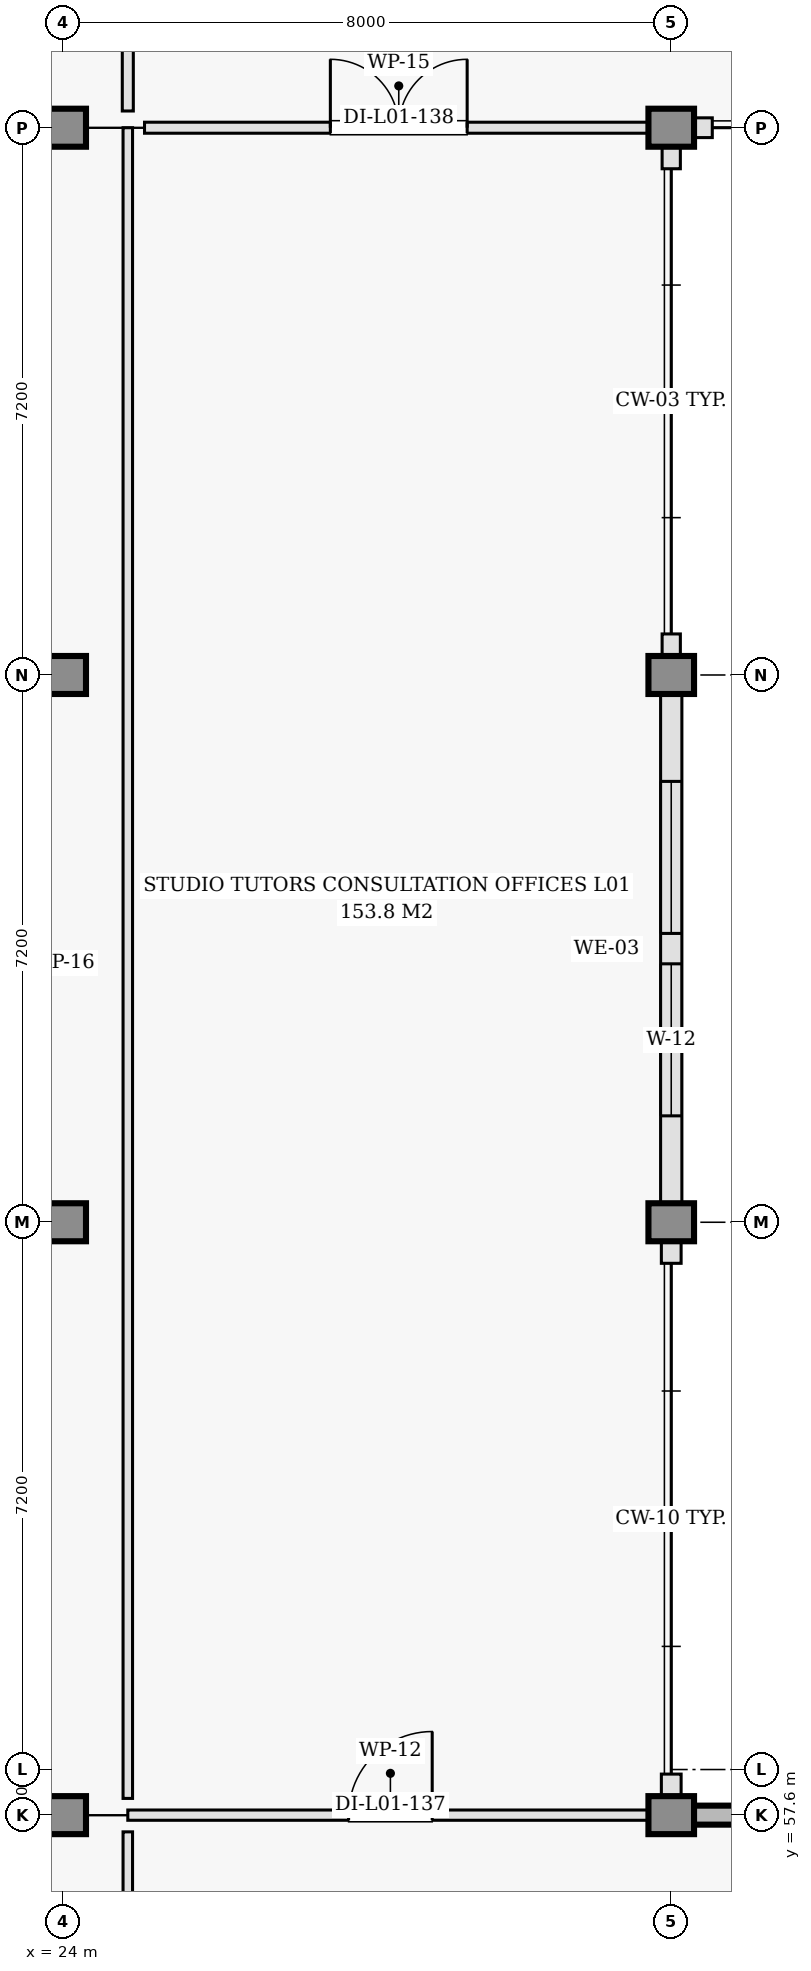
"""IFC4 building model, lengths in metres.
Left out: names, types, materials, properties, quantities, classifications, styles, units other than length and angle.
Written with IfcOpenShell. Run it as: python <this file> out.ifc"""

import sys

from ifc_helpers import new_model, si_unit, direction, frame, frame_2d, origin, origin_2d, place, context, subcontext, project, spatial, rectangle, extrude, element, fill, save


model = new_model("IFC4")
c1 = context("Model", 3, precision=1e-05, world=origin(), true_north=direction((0.0, 1.0)))
c2 = subcontext(c1, "Body", "Model", "MODEL_VIEW")
j1 = project(units=[si_unit("LENGTHUNIT", "METRE"), si_unit("PLANEANGLEUNIT", "RADIAN")], contexts=[c1])
p1 = place(None, origin())
s1 = spatial("IfcSite", under=j1, at=p1, CompositionType="ELEMENT")
p2 = place(p1, origin())
s2 = spatial("IfcBuilding", under=s1, at=p2, CompositionType="ELEMENT")
p3 = place(p2, frame((0.0, 0.0, 4.8)))
s3 = spatial("IfcBuildingStorey", under=s2, at=p3, CompositionType="ELEMENT", Elevation=4.8)
for number, where, z_axis, x_axis in (
    (1, (24.0, 57.6, 0.0), (0.0, 0.0, 1.0), (1.0, 0.0, 0.0)),
    (2, (24.0, 65.4, 0.0), (0.0, 0.0, 1.0), (1.0, 0.0, 0.0)),
    (3, (24.0, 72.6, 0.0), (0.0, 0.0, 1.0), (1.0, 0.0, 0.0)),
    (4, (24.0, 79.8, 0.0), (0.0, 0.0, 1.0), (1.0, 0.0, 0.0)),
    (5, (32.0, 57.6, 0.0), (0.0, 0.0, 1.0), (1.0, 0.0, 0.0)),
    (6, (32.0, 65.4, 0.0), (0.0, 0.0, 1.0), (1.0, 0.0, 0.0)),
    (7, (32.0, 72.6, 0.0), (0.0, 0.0, 1.0), (1.0, 0.0, 0.0)),
    (8, (32.0, 79.8, 0.0), (0.0, 0.0, 1.0), (1.0, 0.0, 0.0)),
):
    element("IfcColumn", number, at=place(p3, frame(where, z_axis=z_axis, x_axis=x_axis)), inside=s3, PredefinedType="COLUMN", context=c2, shape_type="SweptSolid", body=[
        extrude(rectangle(XDim=0.5, YDim=0.5, at=origin_2d()), origin(), (0.0, 0.0, 1.0), 4.8),
    ])
p4 = place(p3, frame((48.0, 57.6, 0.0), z_axis=(0.0, 0.0, 1.0), x_axis=(-1.0, 0.0, 0.0)))
e9 = element("IfcWall", 9, at=p4, inside=s3, PredefinedType="SHEAR", context=c2, shape_type="SweptSolid", body=[
    extrude(rectangle(XDim=16.0, YDim=0.25, at=frame_2d((8.0, 0.0))), origin(), (0.0, 0.0, 1.0), 4.48),
])
p5 = place(p3, frame((32.0, 57.727, 0.0), z_axis=(0.0, 0.0, 1.0), x_axis=(0.0, 1.0, 0.0)))
e10 = element("IfcWall", 10, at=p5, inside=s3, PredefinedType="SOLIDWALL", context=c2, shape_type="SweptSolid", body=[
    extrude(rectangle(XDim=0.413, YDim=0.26, at=frame_2d((0.207, 0.0))), origin(), (0.0, 0.0, 1.0), 3.765),
])
p6 = place(p3, frame((32.0, 64.86, 0.0), z_axis=(0.0, 0.0, 1.0), x_axis=(0.0, 1.0, 0.0)))
e11 = element("IfcWall", 11, at=p6, inside=s3, PredefinedType="SOLIDWALL", context=c2, shape_type="SweptSolid", body=[
    extrude(rectangle(XDim=0.54, YDim=0.26, at=frame_2d((0.27, 0.0))), origin(), (0.0, 0.0, 1.0), 3.765),
])
p7 = place(p3, frame((32.0, 65.4, 0.0), z_axis=(0.0, 0.0, 1.0), x_axis=(0.0, 1.0, 0.0)))
e12 = element("IfcWall", 12, at=p7, inside=s3, PredefinedType="SOLIDWALL", context=c2, shape_type="SweptSolid", body=[
    extrude(rectangle(XDim=7.2, YDim=0.28, at=frame_2d((3.6, 0.0))), origin(), (0.0, 0.0, 1.0), 3.765),
])
p8 = place(p7, frame((1.4, 0.0, 0.85)))
e13 = element("IfcOpeningElement", 13, at=p8, cuts=e12, PredefinedType="OPENING", context=c2, shape_type="SweptSolid", body=[
    extrude(rectangle(XDim=2.0, YDim=1.95, at=frame_2d((1.0, 0.975))), frame((0.0, 0.15, 0.0), z_axis=(0.0, -1.0, 0.0), x_axis=(1.0, 0.0, 0.0)), (0.0, 0.0, 1.0), 0.3),
])
p9 = place(p7, frame((3.8, 0.0, 0.85)))
e14 = element("IfcOpeningElement", 14, at=p9, cuts=e12, PredefinedType="OPENING", context=c2, shape_type="SweptSolid", body=[
    extrude(rectangle(XDim=2.0, YDim=1.95, at=frame_2d((1.0, 0.975))), frame((0.0, 0.15, 0.0), z_axis=(0.0, -1.0, 0.0), x_axis=(1.0, 0.0, 0.0)), (0.0, 0.0, 1.0), 0.3),
])
p10 = place(p3, frame((32.0, 72.6, 0.0), z_axis=(0.0, 0.0, 1.0), x_axis=(0.0, 1.0, 0.0)))
e15 = element("IfcWall", 15, at=p10, inside=s3, PredefinedType="SOLIDWALL", context=c2, shape_type="SweptSolid", body=[
    extrude(rectangle(XDim=0.54, YDim=0.24, at=frame_2d((0.27, 0.0))), origin(), (0.0, 0.0, 1.0), 3.765),
])
p11 = place(p3, frame((32.0, 79.26, 0.0), z_axis=(0.0, 0.0, 1.0), x_axis=(0.0, 1.0, 0.0)))
e16 = element("IfcWall", 16, at=p11, inside=s3, PredefinedType="SOLIDWALL", context=c2, shape_type="SweptSolid", body=[
    extrude(rectangle(XDim=0.54, YDim=0.24, at=frame_2d((0.27, 0.0))), origin(), (0.0, 0.0, 1.0), 3.765),
])
p12 = place(p3, frame((32.122, 79.8, 0.0), z_axis=(0.0, 0.0, 1.0), x_axis=(1.0, 0.0, 0.0)))
e17 = element("IfcWall", 17, at=p12, inside=s3, PredefinedType="SOLIDWALL", context=c2, shape_type="SweptSolid", body=[
    extrude(rectangle(XDim=0.418, YDim=0.26, at=frame_2d((0.209, 0.0))), origin(), (0.0, 0.0, 1.0), 3.915),
])
p13 = place(p3, frame((24.85, 57.6, 0.0), z_axis=(0.0, 0.0, 1.0), x_axis=(1.0, 0.0, 0.0)))
e18 = element("IfcWall", 18, at=p13, inside=s3, PredefinedType="PARTITIONING", context=c2, shape_type="SweptSolid", body=[
    extrude(rectangle(XDim=6.91, YDim=0.135, at=frame_2d((3.455, 0.0))), origin(), (0.0, 0.0, 1.0), 3.765),
])
p14 = place(p13, frame((2.905, 0.0, 0.0)))
e19 = element("IfcOpeningElement", 19, at=p14, cuts=e18, PredefinedType="OPENING", context=c2, shape_type="SweptSolid", body=[
    extrude(rectangle(XDim=1.1, YDim=2.15, at=frame_2d((0.55, 1.075))), frame((0.0, 0.078, 0.0), z_axis=(0.0, -1.0, 0.0), x_axis=(1.0, 0.0, 0.0)), (0.0, 0.0, 1.0), 0.155),
])
p15 = place(p3, frame((24.85, 57.82, 0.0), z_axis=(0.0, 0.0, 1.0), x_axis=(0.0, 1.0, 0.0)))
e20 = element("IfcWall", 20, at=p15, inside=s3, PredefinedType="PARTITIONING", context=c2, shape_type="SweptSolid", body=[
    extrude(rectangle(XDim=21.98, YDim=0.125, at=frame_2d((10.99, 0.0))), origin(), (0.0, 0.0, 1.0), 3.765),
])
p16 = place(p3, frame((25.07, 79.8, 0.0), z_axis=(0.0, 0.0, 1.0), x_axis=(1.0, 0.0, 0.0)))
e21 = element("IfcWall", 21, at=p16, inside=s3, PredefinedType="PARTITIONING", context=c2, shape_type="SweptSolid", body=[
    extrude(rectangle(XDim=6.69, YDim=0.145, at=frame_2d((3.345, 0.0))), origin(), (0.0, 0.0, 1.0), 3.765),
])
p17 = place(p16, frame((2.445, 0.0, 0.0)))
e22 = element("IfcOpeningElement", 22, at=p17, cuts=e21, PredefinedType="OPENING", context=c2, shape_type="SweptSolid", body=[
    extrude(rectangle(XDim=1.8, YDim=2.2, at=frame_2d((0.9, 1.1))), frame((0.0, 0.083, 0.0), z_axis=(0.0, -1.0, 0.0), x_axis=(1.0, 0.0, 0.0)), (0.0, 0.0, 1.0), 0.165),
])
p18 = place(p3, frame((24.85, 80.02, 0.0), z_axis=(0.0, 0.0, 1.0), x_axis=(0.0, 1.0, 0.0)))
e23 = element("IfcWall", 23, at=p18, inside=s3, PredefinedType="PARTITIONING", context=c2, shape_type="SweptSolid", body=[
    extrude(rectangle(XDim=13.875, YDim=0.145, at=frame_2d((6.938, 0.0))), origin(), (0.0, 0.0, 1.0), 3.765),
])
p19 = place(p3, frame((24.85, 36.905, 0.0), z_axis=(0.0, 0.0, 1.0), x_axis=(0.0, 1.0, 0.0)))
e24 = element("IfcWall", 24, at=p19, inside=s3, PredefinedType="PARTITIONING", context=c2, shape_type="SweptSolid", body=[
    extrude(rectangle(XDim=20.475, YDim=0.125, at=frame_2d((10.237, 0.0))), origin(), (0.0, 0.0, 1.0), 3.765),
])
p20 = place(p19, frame((9.338, 0.0, 0.0)))
e25 = element("IfcOpeningElement", 25, at=p20, cuts=e24, PredefinedType="OPENING", context=c2, shape_type="SweptSolid", body=[
    extrude(rectangle(XDim=1.8, YDim=2.2, at=frame_2d((0.9, 1.1))), frame((0.0, 0.073, 0.0), z_axis=(0.0, -1.0, 0.0), x_axis=(1.0, 0.0, 0.0)), (0.0, 0.0, 1.0), 0.145),
])
p21 = place(p8, origin())
e26 = element("IfcWindow", 26, at=p21, inside=s3, PartitioningType="DOUBLE_PANEL_VERTICAL", PredefinedType="WINDOW", context=c2, shape_type="SweptSolid", body=[
    extrude(rectangle(XDim=2.0, YDim=1.95, at=frame_2d((1.0, 0.975))), frame((0.0, 0.03, 0.0), z_axis=(0.0, -1.0, 0.0), x_axis=(1.0, 0.0, 0.0)), (0.0, 0.0, 1.0), 0.06),
])
fill(e13, e26)
p22 = place(p9, origin())
e27 = element("IfcWindow", 27, at=p22, inside=s3, PartitioningType="DOUBLE_PANEL_VERTICAL", PredefinedType="WINDOW", context=c2, shape_type="SweptSolid", body=[
    extrude(rectangle(XDim=2.0, YDim=1.95, at=frame_2d((1.0, 0.975))), frame((0.0, 0.03, 0.0), z_axis=(0.0, -1.0, 0.0), x_axis=(1.0, 0.0, 0.0)), (0.0, 0.0, 1.0), 0.06),
])
fill(e14, e27)
p23 = place(p14, origin())
e28 = element("IfcDoor", 28, at=p23, inside=s3, OperationType="SINGLE_SWING_RIGHT", PredefinedType="DOOR", context=c2, shape_type="SweptSolid", body=[
    extrude(rectangle(XDim=1.1, YDim=2.15, at=frame_2d((0.55, 1.075))), frame((0.0, 0.025, 0.0), z_axis=(0.0, -1.0, 0.0), x_axis=(1.0, 0.0, 0.0)), (0.0, 0.0, 1.0), 0.05),
])
fill(e19, e28)
p24 = place(p17, origin())
e29 = element("IfcDoor", 29, at=p24, inside=s3, OperationType="DOUBLE_DOOR_SINGLE_SWING", PredefinedType="DOOR", context=c2, shape_type="SweptSolid", body=[
    extrude(rectangle(XDim=1.8, YDim=2.2, at=frame_2d((0.9, 1.1))), frame((0.0, 0.025, 0.0), z_axis=(0.0, -1.0, 0.0), x_axis=(1.0, 0.0, 0.0)), (0.0, 0.0, 1.0), 0.05),
])
fill(e22, e29)
save(model, sys.argv[1])
